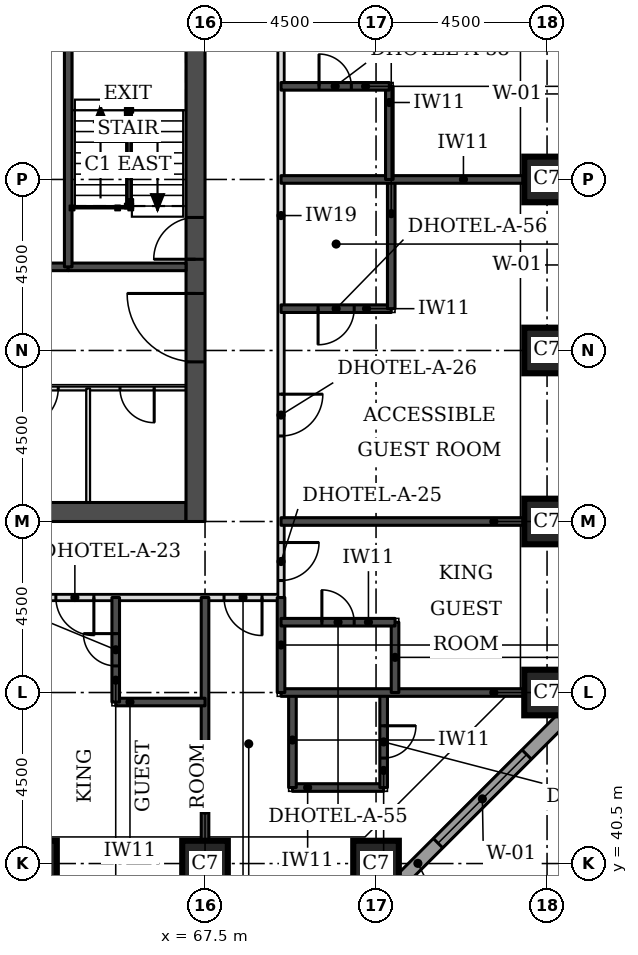
"""IFC4 building model, lengths in metres.
Left out: names, types, materials, properties, quantities, classifications, styles, units other than length and angle.
Written with IfcOpenShell. Run it as: python <this file> out.ifc"""

import sys

from ifc_helpers import new_model, si_unit, direction, frame, frame_2d, origin, origin_2d, place, context, subcontext, project, spatial, rectangle, extrude, element, fill, save


model = new_model("IFC4")
c1 = context("Model", 3, precision=1e-05, world=origin(), true_north=direction((0.0, 1.0)))
c2 = subcontext(c1, "Body", "Model", "MODEL_VIEW")
j1 = project(units=[si_unit("LENGTHUNIT", "METRE"), si_unit("PLANEANGLEUNIT", "RADIAN")], contexts=[c1])
p1 = place(None, origin())
s1 = spatial("IfcSite", under=j1, at=p1, CompositionType="ELEMENT")
p2 = place(p1, origin())
s2 = spatial("IfcBuilding", under=s1, at=p2, CompositionType="ELEMENT")
p3 = place(p2, frame((0.0, 0.0, 49.5)))
s3 = spatial("IfcBuildingStorey", under=s2, at=p3, CompositionType="ELEMENT", Elevation=49.5)
for number, where, z_axis, x_axis in (
    (1, (63.0, 40.5, 0.0), (0.0, 0.0, 1.0), (1.0, 0.0, 0.0)),
    (2, (67.5, 40.5, 0.0), (0.0, 0.0, 1.0), (1.0, 0.0, 0.0)),
    (3, (72.0, 40.5, 0.0), (0.0, 0.0, 1.0), (1.0, 0.0, 0.0)),
    (4, (76.5, 45.0, 0.0), (0.0, 0.0, 1.0), (1.0, 0.0, 0.0)),
    (5, (76.5, 49.5, 0.0), (0.0, 0.0, 1.0), (1.0, 0.0, 0.0)),
    (6, (76.5, 54.0, 0.0), (0.0, 0.0, 1.0), (1.0, 0.0, 0.0)),
    (7, (76.5, 58.5, 0.0), (0.0, 0.0, 1.0), (1.0, 0.0, 0.0)),
):
    element("IfcColumn", number, at=place(p3, frame(where, z_axis=z_axis, x_axis=x_axis)), inside=s3, PredefinedType="COLUMN", context=c2, shape_type="SweptSolid", body=[
        extrude(rectangle(XDim=1.2, YDim=1.2, at=origin_2d()), origin(), (0.0, 0.0, 1.0), 3.3),
    ])
p4 = place(p3, frame((45.5, 49.75, 0.0), z_axis=(0.0, 0.0, 1.0), x_axis=(1.0, 0.0, 0.0)))
e8 = element("IfcWall", 8, at=p4, inside=s3, PredefinedType="SHEAR", context=c2, shape_type="SweptSolid", body=[
    extrude(rectangle(XDim=21.5, YDim=0.5, at=frame_2d((10.75, 0.0))), origin(), (0.0, 0.0, 1.0), 3.3),
])
p5 = place(p3, frame((67.25, 49.5, 0.0), z_axis=(0.0, 0.0, 1.0), x_axis=(0.0, 1.0, 0.0)))
e9 = element("IfcWall", 9, at=p5, inside=s3, PredefinedType="SHEAR", context=c2, shape_type="SweptSolid", body=[
    extrude(rectangle(XDim=22.5, YDim=0.5, at=frame_2d((11.25, 0.0))), origin(), (0.0, 0.0, 1.0), 3.3),
])
p6 = place(p5, frame((4.2, 0.0, 0.0)))
e10 = element("IfcOpeningElement", 10, at=p6, cuts=e9, PredefinedType="OPENING", context=c2, shape_type="SweptSolid", body=[
    extrude(rectangle(XDim=1.8, YDim=2.1, at=frame_2d((0.9, 1.05))), frame((0.0, 0.26, 0.0), z_axis=(0.0, -1.0, 0.0), x_axis=(1.0, 0.0, 0.0)), (0.0, 0.0, 1.0), 0.52),
])
p7 = place(p5, frame((6.9, 0.0, 0.0)))
e11 = element("IfcOpeningElement", 11, at=p7, cuts=e9, PredefinedType="OPENING", context=c2, shape_type="SweptSolid", body=[
    extrude(rectangle(XDim=1.1, YDim=2.1, at=frame_2d((0.55, 1.05))), frame((0.0, 0.26, 0.0), z_axis=(0.0, -1.0, 0.0), x_axis=(1.0, 0.0, 0.0)), (0.0, 0.0, 1.0), 0.52),
])
p8 = place(p5, frame((13.6, 0.0, 0.0)))
e12 = element("IfcOpeningElement", 12, at=p8, cuts=e9, PredefinedType="OPENING", context=c2, shape_type="SweptSolid", body=[
    extrude(rectangle(XDim=1.1, YDim=2.1, at=frame_2d((0.55, 1.05))), frame((0.0, 0.26, 0.0), z_axis=(0.0, -1.0, 0.0), x_axis=(1.0, 0.0, 0.0)), (0.0, 0.0, 1.0), 0.52),
])
p9 = place(p5, frame((16.5, 0.0, 0.0)))
e13 = element("IfcOpeningElement", 13, at=p9, cuts=e9, PredefinedType="OPENING", context=c2, shape_type="SweptSolid", body=[
    extrude(rectangle(XDim=1.8, YDim=2.1, at=frame_2d((0.9, 1.05))), frame((0.0, 0.26, 0.0), z_axis=(0.0, -1.0, 0.0), x_axis=(1.0, 0.0, 0.0)), (0.0, 0.0, 1.0), 0.52),
])
p10 = place(p3, frame((72.27, 39.674, 0.0), z_axis=(0.0, 0.0, 1.0), x_axis=(0.707106781187, 0.707106781187, 0.0)))
e14 = element("IfcWall", 14, at=p10, inside=s3, PredefinedType="STANDARD", context=c2, shape_type="SweptSolid", body=[
    extrude(rectangle(XDim=7.151, YDim=0.35, at=frame_2d((3.576, 0.0))), origin(), (0.0, 0.0, 1.0), 3.055),
])
p11 = place(p10, frame((1.926, 0.0, 0.8)))
e15 = element("IfcOpeningElement", 15, at=p11, cuts=e14, PredefinedType="OPENING", context=c2, shape_type="SweptSolid", body=[
    extrude(rectangle(XDim=3.3, YDim=1.5, at=frame_2d((1.65, 0.75))), frame((0.0, 0.185, 0.0), z_axis=(0.0, -1.0, 0.0), x_axis=(1.0, 0.0, 0.0)), (0.0, 0.0, 1.0), 0.37),
])
p12 = place(p3, frame((51.5, 47.5, 0.0), z_axis=(0.0, 0.0, 1.0), x_axis=(1.0, 0.0, 0.0)))
e16 = element("IfcWall", 16, at=p12, inside=s3, PredefinedType="PARTITIONING", context=c2, shape_type="SweptSolid", body=[
    extrude(rectangle(XDim=18.0, YDim=0.15, at=frame_2d((9.0, 0.0))), origin(), (0.0, 0.0, 1.0), 3.08),
])
p13 = place(p12, frame((12.075, 0.0, 0.0)))
e17 = element("IfcOpeningElement", 17, at=p13, cuts=e16, PredefinedType="OPENING", context=c2, shape_type="SweptSolid", body=[
    extrude(rectangle(XDim=1.0, YDim=2.1, at=frame_2d((0.5, 1.05))), frame((0.0, 0.085, 0.0), z_axis=(0.0, -1.0, 0.0), x_axis=(1.0, 0.0, 0.0)), (0.0, 0.0, 1.0), 0.17),
])
p14 = place(p12, frame((9.675, 0.0, 0.0)))
e18 = element("IfcOpeningElement", 18, at=p14, cuts=e16, PredefinedType="OPENING", context=c2, shape_type="SweptSolid", body=[
    extrude(rectangle(XDim=1.0, YDim=2.1, at=frame_2d((0.5, 1.05))), frame((0.0, 0.085, 0.0), z_axis=(0.0, -1.0, 0.0), x_axis=(1.0, 0.0, 0.0)), (0.0, 0.0, 1.0), 0.17),
])
p15 = place(p12, frame((16.5, 0.0, 0.0)))
e19 = element("IfcOpeningElement", 19, at=p15, cuts=e16, PredefinedType="OPENING", context=c2, shape_type="SweptSolid", body=[
    extrude(rectangle(XDim=1.0, YDim=2.1, at=frame_2d((0.5, 1.05))), frame((0.0, 0.085, 0.0), z_axis=(0.0, -1.0, 0.0), x_axis=(1.0, 0.0, 0.0)), (0.0, 0.0, 1.0), 0.17),
])
p16 = place(p3, frame((69.5, 47.5, 0.0), z_axis=(0.0, 0.0, 1.0), x_axis=(0.0, 1.0, 0.0)))
e20 = element("IfcWall", 20, at=p16, inside=s3, PredefinedType="PARTITIONING", context=c2, shape_type="SweptSolid", body=[
    extrude(rectangle(XDim=26.5, YDim=0.15, at=frame_2d((13.25, 0.0))), origin(), (0.0, 0.0, 1.0), 3.08),
])
p17 = place(p16, frame((22.525, 0.0, 0.0)))
e21 = element("IfcOpeningElement", 21, at=p17, cuts=e20, PredefinedType="OPENING", context=c2, shape_type="SweptSolid", body=[
    extrude(rectangle(XDim=1.0, YDim=2.1, at=frame_2d((0.5, 1.05))), frame((0.0, 0.085, 0.0), z_axis=(0.0, -1.0, 0.0), x_axis=(1.0, 0.0, 0.0)), (0.0, 0.0, 1.0), 0.17),
])
p18 = place(p16, frame((16.225, 0.0, 0.0)))
e22 = element("IfcOpeningElement", 22, at=p18, cuts=e20, PredefinedType="OPENING", context=c2, shape_type="SweptSolid", body=[
    extrude(rectangle(XDim=1.0, YDim=2.1, at=frame_2d((0.5, 1.05))), frame((0.0, 0.085, 0.0), z_axis=(0.0, -1.0, 0.0), x_axis=(1.0, 0.0, 0.0)), (0.0, 0.0, 1.0), 0.17),
])
p19 = place(p16, frame((4.25, 0.0, 0.0)))
e23 = element("IfcOpeningElement", 23, at=p19, cuts=e20, PredefinedType="OPENING", context=c2, shape_type="SweptSolid", body=[
    extrude(rectangle(XDim=1.1, YDim=2.1, at=frame_2d((0.55, 1.05))), frame((0.0, 0.085, 0.0), z_axis=(0.0, -1.0, 0.0), x_axis=(1.0, 0.0, 0.0)), (0.0, 0.0, 1.0), 0.17),
])
p20 = place(p16, frame((0.447, 0.0, 0.0)))
e24 = element("IfcOpeningElement", 24, at=p20, cuts=e20, PredefinedType="OPENING", context=c2, shape_type="SweptSolid", body=[
    extrude(rectangle(XDim=1.0, YDim=2.1, at=frame_2d((0.5, 1.05))), frame((0.0, 0.085, 0.0), z_axis=(0.0, -1.0, 0.0), x_axis=(1.0, 0.0, 0.0)), (0.0, 0.0, 1.0), 0.17),
])
p21 = place(p3, frame((67.5, 41.1, 0.0), z_axis=(0.0, 0.0, 1.0), x_axis=(0.0, 1.0, 0.0)))
e25 = element("IfcWall", 25, at=p21, inside=s3, PredefinedType="SOLIDWALL", context=c2, shape_type="SweptSolid", body=[
    extrude(rectangle(XDim=6.4, YDim=0.2, at=frame_2d((3.2, 0.0))), origin(), (0.0, 0.0, 1.0), 3.08),
])
p22 = place(p3, frame((69.8, 42.5, 0.0), z_axis=(0.0, 0.0, 1.0), x_axis=(1.0, 0.0, 0.0)))
e26 = element("IfcWall", 26, at=p22, inside=s3, PredefinedType="SOLIDWALL", context=c2, shape_type="SweptSolid", body=[
    extrude(rectangle(XDim=2.4, YDim=0.2, at=frame_2d((1.2, 0.0))), origin(), (0.0, 0.0, 1.0), 3.08),
])
p23 = place(p3, frame((69.8, 42.5, 0.0), z_axis=(0.0, 0.0, 1.0), x_axis=(0.0, 1.0, 0.0)))
e27 = element("IfcWall", 27, at=p23, inside=s3, PredefinedType="SOLIDWALL", context=c2, shape_type="SweptSolid", body=[
    extrude(rectangle(XDim=2.5, YDim=0.2, at=frame_2d((1.25, 0.0))), origin(), (0.0, 0.0, 1.0), 3.08),
])
p24 = place(p3, frame((72.2, 42.5, 0.0), z_axis=(0.0, 0.0, 1.0), x_axis=(0.0, 1.0, 0.0)))
e28 = element("IfcWall", 28, at=p24, inside=s3, PredefinedType="SOLIDWALL", context=c2, shape_type="SweptSolid", body=[
    extrude(rectangle(XDim=2.5, YDim=0.2, at=frame_2d((1.25, 0.0))), origin(), (0.0, 0.0, 1.0), 3.08),
])
p25 = place(p24, frame((0.775, 0.0, 0.0)))
e29 = element("IfcOpeningElement", 29, at=p25, cuts=e28, PredefinedType="OPENING", context=c2, shape_type="SweptSolid", body=[
    extrude(rectangle(XDim=0.85, YDim=2.1, at=frame_2d((0.425, 1.05))), frame((0.0, 0.11, 0.0), z_axis=(0.0, -1.0, 0.0), x_axis=(1.0, 0.0, 0.0)), (0.0, 0.0, 1.0), 0.22),
])
p26 = place(p3, frame((65.15, 44.75, 0.0), z_axis=(0.0, 0.0, 1.0), x_axis=(1.0, 0.0, 0.0)))
e30 = element("IfcWall", 30, at=p26, inside=s3, PredefinedType="SOLIDWALL", context=c2, shape_type="SweptSolid", body=[
    extrude(rectangle(XDim=2.35, YDim=0.2, at=frame_2d((1.175, 0.0))), origin(), (0.0, 0.0, 1.0), 3.08),
])
p27 = place(p3, frame((65.15, 44.75, 0.0), z_axis=(0.0, 0.0, 1.0), x_axis=(0.0, 1.0, 0.0)))
e31 = element("IfcWall", 31, at=p27, inside=s3, PredefinedType="SOLIDWALL", context=c2, shape_type="SweptSolid", body=[
    extrude(rectangle(XDim=2.75, YDim=0.2, at=frame_2d((1.375, 0.0))), origin(), (0.0, 0.0, 1.0), 3.08),
])
p28 = place(p27, frame((0.95, 0.0, 0.0)))
e32 = element("IfcOpeningElement", 32, at=p28, cuts=e31, PredefinedType="OPENING", context=c2, shape_type="SweptSolid", body=[
    extrude(rectangle(XDim=0.85, YDim=2.1, at=frame_2d((0.425, 1.05))), frame((0.0, 0.11, 0.0), z_axis=(0.0, -1.0, 0.0), x_axis=(1.0, 0.0, 0.0)), (0.0, 0.0, 1.0), 0.22),
])
p29 = place(p3, frame((69.5, 45.0, 0.0), z_axis=(0.0, 0.0, 1.0), x_axis=(1.0, 0.0, 0.0)))
e33 = element("IfcWall", 33, at=p29, inside=s3, PredefinedType="SOLIDWALL", context=c2, shape_type="SweptSolid", body=[
    extrude(rectangle(XDim=6.4, YDim=0.2, at=frame_2d((3.2, 0.0))), origin(), (0.0, 0.0, 1.0), 3.08),
])
p30 = place(p3, frame((69.5, 45.0, 0.0), z_axis=(0.0, 0.0, 1.0), x_axis=(0.0, 1.0, 0.0)))
e34 = element("IfcWall", 34, at=p30, inside=s3, PredefinedType="SOLIDWALL", context=c2, shape_type="SweptSolid", body=[
    extrude(rectangle(XDim=2.5, YDim=0.2, at=frame_2d((1.25, 0.0))), origin(), (0.0, 0.0, 1.0), 3.08),
])
p31 = place(p3, frame((72.5, 45.0, 0.0), z_axis=(0.0, 0.0, 1.0), x_axis=(0.0, 1.0, 0.0)))
e35 = element("IfcWall", 35, at=p31, inside=s3, PredefinedType="SOLIDWALL", context=c2, shape_type="SweptSolid", body=[
    extrude(rectangle(XDim=1.85, YDim=0.2, at=frame_2d((0.925, 0.0))), origin(), (0.0, 0.0, 1.0), 3.08),
])
p32 = place(p3, frame((69.5, 46.85, 0.0), z_axis=(0.0, 0.0, 1.0), x_axis=(1.0, 0.0, 0.0)))
e36 = element("IfcWall", 36, at=p32, inside=s3, PredefinedType="SOLIDWALL", context=c2, shape_type="SweptSolid", body=[
    extrude(rectangle(XDim=3.0, YDim=0.2, at=frame_2d((1.5, 0.0))), origin(), (0.0, 0.0, 1.0), 3.08),
])
p33 = place(p32, frame((1.075, 0.0, 0.0)))
e37 = element("IfcOpeningElement", 37, at=p33, cuts=e36, PredefinedType="OPENING", context=c2, shape_type="SweptSolid", body=[
    extrude(rectangle(XDim=0.85, YDim=2.1, at=frame_2d((0.425, 1.05))), frame((0.0, 0.11, 0.0), z_axis=(0.0, -1.0, 0.0), x_axis=(1.0, 0.0, 0.0)), (0.0, 0.0, 1.0), 0.22),
])
p34 = place(p3, frame((69.5, 49.5, 0.0), z_axis=(0.0, 0.0, 1.0), x_axis=(1.0, 0.0, 0.0)))
e38 = element("IfcWall", 38, at=p34, inside=s3, PredefinedType="SOLIDWALL", context=c2, shape_type="SweptSolid", body=[
    extrude(rectangle(XDim=6.4, YDim=0.2, at=frame_2d((3.2, 0.0))), origin(), (0.0, 0.0, 1.0), 3.08),
])
p35 = place(p3, frame((69.5, 55.1, 0.0), z_axis=(0.0, 0.0, 1.0), x_axis=(1.0, 0.0, 0.0)))
e39 = element("IfcWall", 39, at=p35, inside=s3, PredefinedType="SOLIDWALL", context=c2, shape_type="SweptSolid", body=[
    extrude(rectangle(XDim=2.9, YDim=0.2, at=frame_2d((1.45, 0.0))), origin(), (0.0, 0.0, 1.0), 3.08),
])
p36 = place(p35, frame((0.975, 0.0, 0.0)))
e40 = element("IfcOpeningElement", 40, at=p36, cuts=e39, PredefinedType="OPENING", context=c2, shape_type="SweptSolid", body=[
    extrude(rectangle(XDim=0.95, YDim=2.1, at=frame_2d((0.475, 1.05))), frame((0.0, 0.11, 0.0), z_axis=(0.0, -1.0, 0.0), x_axis=(1.0, 0.0, 0.0)), (0.0, 0.0, 1.0), 0.22),
])
p37 = place(p3, frame((72.4, 55.1, 0.0), z_axis=(0.0, 0.0, 1.0), x_axis=(0.0, 1.0, 0.0)))
e41 = element("IfcWall", 41, at=p37, inside=s3, PredefinedType="SOLIDWALL", context=c2, shape_type="SweptSolid", body=[
    extrude(rectangle(XDim=3.4, YDim=0.2, at=frame_2d((1.7, 0.0))), origin(), (0.0, 0.0, 1.0), 3.08),
])
p38 = place(p3, frame((69.5, 58.5, 0.0), z_axis=(0.0, 0.0, 1.0), x_axis=(1.0, 0.0, 0.0)))
e42 = element("IfcWall", 42, at=p38, inside=s3, PredefinedType="SOLIDWALL", context=c2, shape_type="SweptSolid", body=[
    extrude(rectangle(XDim=6.4, YDim=0.2, at=frame_2d((3.2, 0.0))), origin(), (0.0, 0.0, 1.0), 3.08),
])
p39 = place(p3, frame((72.35, 58.5, 0.0), z_axis=(0.0, 0.0, 1.0), x_axis=(0.0, 1.0, 0.0)))
e43 = element("IfcWall", 43, at=p39, inside=s3, PredefinedType="SOLIDWALL", context=c2, shape_type="SweptSolid", body=[
    extrude(rectangle(XDim=2.45, YDim=0.2, at=frame_2d((1.225, 0.0))), origin(), (0.0, 0.0, 1.0), 3.08),
])
p40 = place(p3, frame((69.5, 60.95, 0.0), z_axis=(0.0, 0.0, 1.0), x_axis=(1.0, 0.0, 0.0)))
e44 = element("IfcWall", 44, at=p40, inside=s3, PredefinedType="SOLIDWALL", context=c2, shape_type="SweptSolid", body=[
    extrude(rectangle(XDim=2.85, YDim=0.2, at=frame_2d((1.425, 0.0))), origin(), (0.0, 0.0, 1.0), 3.08),
])
p41 = place(p40, frame((1.0, 0.0, 0.0)))
e45 = element("IfcOpeningElement", 45, at=p41, cuts=e44, PredefinedType="OPENING", context=c2, shape_type="SweptSolid", body=[
    extrude(rectangle(XDim=0.85, YDim=2.1, at=frame_2d((0.425, 1.05))), frame((0.0, 0.11, 0.0), z_axis=(0.0, -1.0, 0.0), x_axis=(1.0, 0.0, 0.0)), (0.0, 0.0, 1.0), 0.22),
])
p42 = place(p3, frame((61.85, 53.0, 0.0), z_axis=(0.0, 0.0, 1.0), x_axis=(1.0, 0.0, 0.0)))
e46 = element("IfcWall", 46, at=p42, inside=s3, PredefinedType="PARTITIONING", context=c2, shape_type="SweptSolid", body=[
    extrude(rectangle(XDim=5.15, YDim=0.1, at=frame_2d((2.575, 0.0))), origin(), (0.0, 0.0, 1.0), 3.08),
])
p43 = place(p42, frame((3.413, 0.0, 0.0)))
e47 = element("IfcOpeningElement", 47, at=p43, cuts=e46, PredefinedType="OPENING", context=c2, shape_type="SweptSolid", body=[
    extrude(rectangle(XDim=0.9, YDim=2.1, at=frame_2d((0.45, 1.05))), frame((0.0, 0.06, 0.0), z_axis=(0.0, -1.0, 0.0), x_axis=(1.0, 0.0, 0.0)), (0.0, 0.0, 1.0), 0.12),
])
p44 = place(p42, frame((0.788, 0.0, 0.0)))
e48 = element("IfcOpeningElement", 48, at=p44, cuts=e46, PredefinedType="OPENING", context=c2, shape_type="SweptSolid", body=[
    extrude(rectangle(XDim=1.0, YDim=2.1, at=frame_2d((0.5, 1.05))), frame((0.0, 0.06, 0.0), z_axis=(0.0, -1.0, 0.0), x_axis=(1.0, 0.0, 0.0)), (0.0, 0.0, 1.0), 0.12),
])
p45 = place(p3, frame((61.85, 56.2, 0.0), z_axis=(0.0, 0.0, 1.0), x_axis=(1.0, 0.0, 0.0)))
e49 = element("IfcWall", 49, at=p45, inside=s3, PredefinedType="SOLIDWALL", context=c2, shape_type="SweptSolid", body=[
    extrude(rectangle(XDim=2.05, YDim=0.2, at=frame_2d((1.025, 0.0))), origin(), (0.0, 0.0, 1.0), 3.08),
])
p46 = place(p3, frame((63.9, 56.2, 0.0), z_axis=(0.0, 0.0, 1.0), x_axis=(1.0, 0.0, 0.0)))
e50 = element("IfcWall", 50, at=p46, inside=s3, PredefinedType="SOLIDWALL", context=c2, shape_type="SweptSolid", body=[
    extrude(rectangle(XDim=3.1, YDim=0.2, at=frame_2d((1.55, 0.0))), origin(), (0.0, 0.0, 1.0), 3.08),
])
p47 = place(p3, frame((63.9, 56.2, 0.0), z_axis=(0.0, 0.0, 1.0), x_axis=(0.0, 1.0, 0.0)))
e51 = element("IfcWall", 51, at=p47, inside=s3, PredefinedType="SOLIDWALL", context=c2, shape_type="SweptSolid", body=[
    extrude(rectangle(XDim=5.8, YDim=0.2, at=frame_2d((2.9, 0.0))), origin(), (0.0, 0.0, 1.0), 3.08),
])
p48 = place(p3, frame((64.425, 50.0, 0.0), z_axis=(0.0, 0.0, 1.0), x_axis=(0.0, 1.0, 0.0)))
e52 = element("IfcWall", 52, at=p48, inside=s3, PredefinedType="PARTITIONING", context=c2, shape_type="SweptSolid", body=[
    extrude(rectangle(XDim=3.0, YDim=0.1, at=frame_2d((1.5, 0.0))), origin(), (0.0, 0.0, 1.0), 3.08),
])
p49 = place(p11, origin())
e53 = element("IfcWindow", 53, at=p49, inside=s3, PartitioningType="SINGLE_PANEL", PredefinedType="WINDOW", context=c2, shape_type="SweptSolid", body=[
    extrude(rectangle(XDim=3.3, YDim=1.5, at=frame_2d((1.65, 0.75))), frame((0.0, 0.085, 0.0), z_axis=(0.0, -1.0, 0.0), x_axis=(1.0, 0.0, 0.0)), (0.0, 0.0, 1.0), 0.06),
])
fill(e15, e53)
p50 = place(p41, origin())
e54 = element("IfcDoor", 54, at=p50, inside=s3, OperationType="SINGLE_SWING_LEFT", PredefinedType="DOOR", context=c2, shape_type="SweptSolid", body=[
    extrude(rectangle(XDim=0.85, YDim=2.1, at=frame_2d((0.425, 1.05))), frame((0.0, 0.025, 0.0), z_axis=(0.0, -1.0, 0.0), x_axis=(1.0, 0.0, 0.0)), (0.0, 0.0, 1.0), 0.05),
])
fill(e45, e54)
p51 = place(p19, frame((1.1, 0.0, 0.0), z_axis=(0.0, 0.0, 1.0), x_axis=(-1.0, 0.0, 0.0)))
e55 = element("IfcDoor", 55, at=p51, inside=s3, OperationType="SINGLE_SWING_LEFT", PredefinedType="DOOR", context=c2, shape_type="SweptSolid", body=[
    extrude(rectangle(XDim=1.1, YDim=2.1, at=frame_2d((0.55, 1.05))), frame((0.0, 0.025, 0.0), z_axis=(0.0, -1.0, 0.0), x_axis=(1.0, 0.0, 0.0)), (0.0, 0.0, 1.0), 0.05),
])
fill(e23, e55)
p52 = place(p36, frame((0.95, 0.0, 0.0), z_axis=(0.0, 0.0, 1.0), x_axis=(-1.0, 0.0, 0.0)))
e56 = element("IfcDoor", 56, at=p52, inside=s3, OperationType="SINGLE_SWING_RIGHT", PredefinedType="DOOR", context=c2, shape_type="SweptSolid", body=[
    extrude(rectangle(XDim=0.95, YDim=2.1, at=frame_2d((0.475, 1.05))), frame((0.0, 0.025, 0.0), z_axis=(0.0, -1.0, 0.0), x_axis=(1.0, 0.0, 0.0)), (0.0, 0.0, 1.0), 0.05),
])
fill(e40, e56)
p53 = place(p20, frame((1.0, 0.0, 0.0), z_axis=(0.0, 0.0, 1.0), x_axis=(-1.0, 0.0, 0.0)))
e57 = element("IfcDoor", 57, at=p53, inside=s3, OperationType="SINGLE_SWING_LEFT", PredefinedType="DOOR", context=c2, shape_type="SweptSolid", body=[
    extrude(rectangle(XDim=1.0, YDim=2.1, at=frame_2d((0.5, 1.05))), frame((0.0, 0.025, 0.0), z_axis=(0.0, -1.0, 0.0), x_axis=(1.0, 0.0, 0.0)), (0.0, 0.0, 1.0), 0.05),
])
fill(e24, e57)
p54 = place(p33, origin())
e58 = element("IfcDoor", 58, at=p54, inside=s3, OperationType="SINGLE_SWING_LEFT", PredefinedType="DOOR", context=c2, shape_type="SweptSolid", body=[
    extrude(rectangle(XDim=0.85, YDim=2.1, at=frame_2d((0.425, 1.05))), frame((0.0, 0.025, 0.0), z_axis=(0.0, -1.0, 0.0), x_axis=(1.0, 0.0, 0.0)), (0.0, 0.0, 1.0), 0.05),
])
fill(e37, e58)
p55 = place(p13, frame((1.0, 0.0, 0.0), z_axis=(0.0, 0.0, 1.0), x_axis=(-1.0, 0.0, 0.0)))
e59 = element("IfcDoor", 59, at=p55, inside=s3, OperationType="SINGLE_SWING_LEFT", PredefinedType="DOOR", context=c2, shape_type="SweptSolid", body=[
    extrude(rectangle(XDim=1.0, YDim=2.1, at=frame_2d((0.5, 1.05))), frame((0.0, 0.025, 0.0), z_axis=(0.0, -1.0, 0.0), x_axis=(1.0, 0.0, 0.0)), (0.0, 0.0, 1.0), 0.05),
])
fill(e17, e59)
p56 = place(p28, origin())
e60 = element("IfcDoor", 60, at=p56, inside=s3, OperationType="SINGLE_SWING_RIGHT", PredefinedType="DOOR", context=c2, shape_type="SweptSolid", body=[
    extrude(rectangle(XDim=0.85, YDim=2.1, at=frame_2d((0.425, 1.05))), frame((0.0, 0.025, 0.0), z_axis=(0.0, -1.0, 0.0), x_axis=(1.0, 0.0, 0.0)), (0.0, 0.0, 1.0), 0.05),
])
fill(e32, e60)
p57 = place(p15, frame((1.0, 0.0, 0.0), z_axis=(0.0, 0.0, 1.0), x_axis=(-1.0, 0.0, 0.0)))
e61 = element("IfcDoor", 61, at=p57, inside=s3, OperationType="SINGLE_SWING_LEFT", PredefinedType="DOOR", context=c2, shape_type="SweptSolid", body=[
    extrude(rectangle(XDim=1.0, YDim=2.1, at=frame_2d((0.5, 1.05))), frame((0.0, 0.025, 0.0), z_axis=(0.0, -1.0, 0.0), x_axis=(1.0, 0.0, 0.0)), (0.0, 0.0, 1.0), 0.05),
])
fill(e19, e61)
p58 = place(p25, frame((0.85, 0.0, 0.0), z_axis=(0.0, 0.0, 1.0), x_axis=(-1.0, 0.0, 0.0)))
e62 = element("IfcDoor", 62, at=p58, inside=s3, OperationType="SINGLE_SWING_LEFT", PredefinedType="DOOR", context=c2, shape_type="SweptSolid", body=[
    extrude(rectangle(XDim=0.85, YDim=2.1, at=frame_2d((0.425, 1.05))), frame((0.0, 0.025, 0.0), z_axis=(0.0, -1.0, 0.0), x_axis=(1.0, 0.0, 0.0)), (0.0, 0.0, 1.0), 0.05),
])
fill(e29, e62)
p59 = place(p6, origin())
e63 = element("IfcDoor", 63, at=p59, inside=s3, OperationType="SINGLE_SWING_RIGHT", PredefinedType="DOOR", context=c2, shape_type="SweptSolid", body=[
    extrude(rectangle(XDim=1.8, YDim=2.1, at=frame_2d((0.9, 1.05))), frame((0.0, 0.025, 0.0), z_axis=(0.0, -1.0, 0.0), x_axis=(1.0, 0.0, 0.0)), (0.0, 0.0, 1.0), 0.05),
])
fill(e10, e63)
p60 = place(p7, origin())
e64 = element("IfcDoor", 64, at=p60, inside=s3, OperationType="SINGLE_SWING_LEFT", PredefinedType="DOOR", context=c2, shape_type="SweptSolid", body=[
    extrude(rectangle(XDim=1.1, YDim=2.1, at=frame_2d((0.55, 1.05))), frame((0.0, 0.025, 0.0), z_axis=(0.0, -1.0, 0.0), x_axis=(1.0, 0.0, 0.0)), (0.0, 0.0, 1.0), 0.05),
])
fill(e11, e64)
p61 = place(p43, frame((0.9, 0.0, 0.0), z_axis=(0.0, 0.0, 1.0), x_axis=(-1.0, 0.0, 0.0)))
e65 = element("IfcDoor", 65, at=p61, inside=s3, OperationType="SINGLE_SWING_LEFT", PredefinedType="DOOR", context=c2, shape_type="SweptSolid", body=[
    extrude(rectangle(XDim=0.9, YDim=2.1, at=frame_2d((0.45, 1.05))), frame((0.0, 0.025, 0.0), z_axis=(0.0, -1.0, 0.0), x_axis=(1.0, 0.0, 0.0)), (0.0, 0.0, 1.0), 0.05),
])
fill(e47, e65)
p62 = place(p44, frame((1.0, 0.0, 0.0), z_axis=(0.0, 0.0, 1.0), x_axis=(-1.0, 0.0, 0.0)))
e66 = element("IfcDoor", 66, at=p62, inside=s3, OperationType="SINGLE_SWING_RIGHT", PredefinedType="DOOR", context=c2, shape_type="SweptSolid", body=[
    extrude(rectangle(XDim=1.0, YDim=2.1, at=frame_2d((0.5, 1.05))), frame((0.0, 0.025, 0.0), z_axis=(0.0, -1.0, 0.0), x_axis=(1.0, 0.0, 0.0)), (0.0, 0.0, 1.0), 0.05),
])
fill(e48, e66)
save(model, sys.argv[1])
